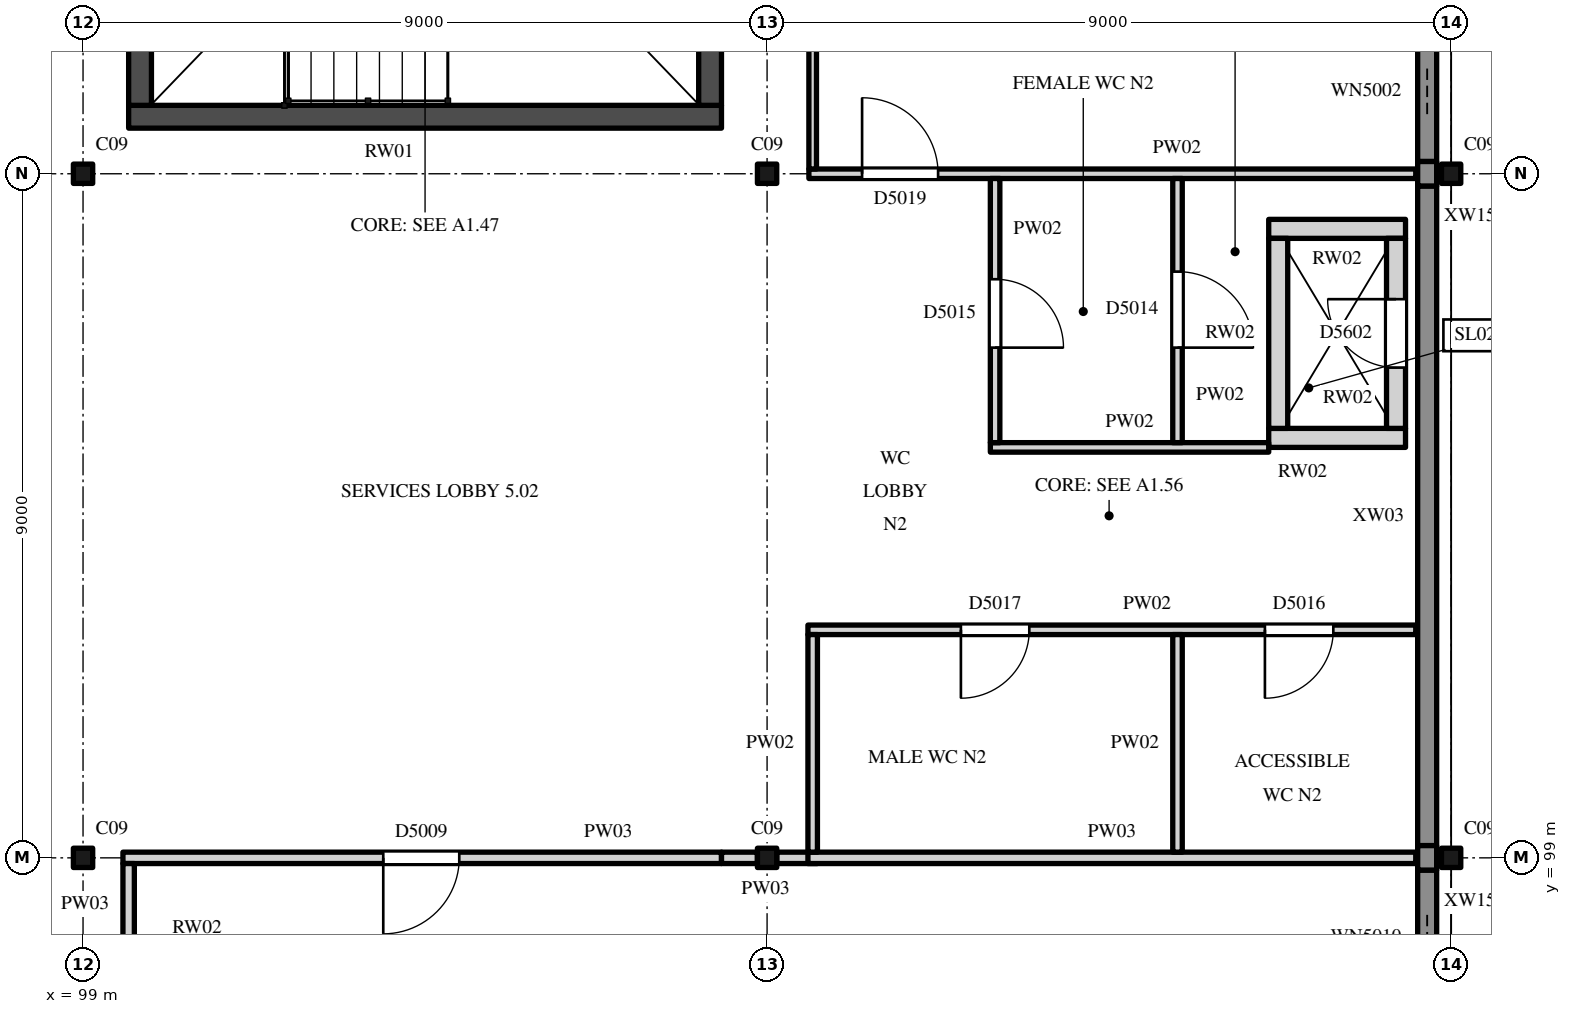
"""IFC4 building model, lengths in metres.
Left out: names, types, materials, properties, quantities, classifications, styles, units other than length and angle.
Written with IfcOpenShell. Run it as: python <this file> out.ifc"""

import sys

from ifc_helpers import new_model, si_unit, direction, frame, frame_2d, origin, origin_2d, place, context, subcontext, project, spatial, rectangle, i_section, extrude, element, fill, save


model = new_model("IFC4")
c1 = context("Model", 3, precision=1e-05, world=origin(), true_north=direction((0.0, 1.0)))
c2 = subcontext(c1, "Body", "Model", "MODEL_VIEW")
j1 = project(units=[si_unit("LENGTHUNIT", "METRE"), si_unit("PLANEANGLEUNIT", "RADIAN")], contexts=[c1])
p1 = place(None, origin())
s1 = spatial("IfcSite", under=j1, at=p1, CompositionType="ELEMENT")
p2 = place(p1, origin())
s2 = spatial("IfcBuilding", under=s1, at=p2, CompositionType="ELEMENT")
p3 = place(p2, frame((0.0, 0.0, 31.0)))
s3 = spatial("IfcBuildingStorey", under=s2, at=p3, CompositionType="ELEMENT", Elevation=31.0)
for number, where, z_axis, x_axis in (
    (1, (99.0, 99.0, 0.0), (0.0, 0.0, 1.0), (1.0, 0.0, 0.0)),
    (2, (108.0, 99.0, 0.0), (0.0, 0.0, 1.0), (1.0, 0.0, 0.0)),
    (3, (117.0, 99.0, 0.0), (0.0, 0.0, 1.0), (1.0, 0.0, 0.0)),
    (4, (99.0, 108.0, 0.0), (0.0, 0.0, 1.0), (1.0, 0.0, 0.0)),
    (5, (108.0, 108.0, 0.0), (0.0, 0.0, 1.0), (1.0, 0.0, 0.0)),
    (6, (117.0, 108.0, 0.0), (0.0, 0.0, 1.0), (1.0, 0.0, 0.0)),
):
    element("IfcColumn", number, at=place(p3, frame(where, z_axis=z_axis, x_axis=x_axis)), inside=s3, PredefinedType="COLUMN", context=c2, shape_type="SweptSolid", body=[
        extrude(i_section(OverallWidth=0.254, OverallDepth=0.254, WebThickness=0.009, FlangeThickness=0.014, FilletRadius=0.014, at=origin_2d()), origin(), (0.0, 0.0, 1.0), 5.0),
    ])
p4 = place(p3, frame((99.6, 108.75, 0.0), z_axis=(0.0, 0.0, 1.0), x_axis=(1.0, 0.0, 0.0)))
e7 = element("IfcWall", 7, at=p4, inside=s3, PredefinedType="SHEAR", context=c2, shape_type="SweptSolid", body=[
    extrude(rectangle(XDim=7.8, YDim=0.3, at=frame_2d((3.9, 0.0))), origin(), (0.0, 0.0, 1.0), 5.0),
])
p5 = place(p3, frame((99.75, 108.9, 0.0), z_axis=(0.0, 0.0, 1.0), x_axis=(0.0, 1.0, 0.0)))
e8 = element("IfcWall", 8, at=p5, inside=s3, PredefinedType="SHEAR", context=c2, shape_type="SweptSolid", body=[
    extrude(rectangle(XDim=7.8, YDim=0.3, at=frame_2d((3.9, 0.0))), origin(), (0.0, 0.0, 1.0), 5.0),
])
p6 = place(p5, frame((4.1, 0.0, 0.0)))
e9 = element("IfcOpeningElement", 9, at=p6, cuts=e8, PredefinedType="OPENING", context=c2, shape_type="SweptSolid", body=[
    extrude(rectangle(XDim=1.2, YDim=2.1, at=frame_2d((0.6, 1.05))), frame((0.0, 0.16, 0.0), z_axis=(0.0, -1.0, 0.0), x_axis=(1.0, 0.0, 0.0)), (0.0, 0.0, 1.0), 0.32),
])
p7 = place(p3, frame((107.25, 108.9, 0.0), z_axis=(0.0, 0.0, 1.0), x_axis=(0.0, 1.0, 0.0)))
e10 = element("IfcWall", 10, at=p7, inside=s3, PredefinedType="SHEAR", context=c2, shape_type="SweptSolid", body=[
    extrude(rectangle(XDim=7.8, YDim=0.3, at=frame_2d((3.9, 0.0))), origin(), (0.0, 0.0, 1.0), 5.0),
])
for number, where, z_axis, x_axis in (
    (11, (114.6, 104.525, 0.0), (0.0, 0.0, 1.0), (1.0, 0.0, 0.0)),
    (12, (114.6, 107.275, 0.0), (0.0, 0.0, 1.0), (1.0, 0.0, 0.0)),
):
    element("IfcWall", number, at=place(p3, frame(where, z_axis=z_axis, x_axis=x_axis)), inside=s3, PredefinedType="STANDARD", context=c2, shape_type="SweptSolid", body=[
        extrude(rectangle(XDim=1.8, YDim=0.25, at=frame_2d((0.9, 0.0))), origin(), (0.0, 0.0, 1.0), 5.0),
    ])
p8 = place(p3, frame((114.725, 104.65, 0.0), z_axis=(0.0, 0.0, 1.0), x_axis=(0.0, 1.0, 0.0)))
e13 = element("IfcWall", 13, at=p8, inside=s3, PredefinedType="STANDARD", context=c2, shape_type="SweptSolid", body=[
    extrude(rectangle(XDim=2.5, YDim=0.25, at=frame_2d((1.25, 0.0))), origin(), (0.0, 0.0, 1.0), 5.0),
])
p9 = place(p3, frame((116.275, 104.65, 0.0), z_axis=(0.0, 0.0, 1.0), x_axis=(0.0, 1.0, 0.0)))
e14 = element("IfcWall", 14, at=p9, inside=s3, PredefinedType="STANDARD", context=c2, shape_type="SweptSolid", body=[
    extrude(rectangle(XDim=2.5, YDim=0.25, at=frame_2d((1.25, 0.0))), origin(), (0.0, 0.0, 1.0), 5.0),
])
p10 = place(p9, frame((0.8, 0.0, 0.0)))
e15 = element("IfcOpeningElement", 15, at=p10, cuts=e14, PredefinedType="OPENING", context=c2, shape_type="SweptSolid", body=[
    extrude(rectangle(XDim=0.9, YDim=2.1, at=frame_2d((0.45, 1.05))), frame((0.0, 0.135, 0.0), z_axis=(0.0, -1.0, 0.0), x_axis=(1.0, 0.0, 0.0)), (0.0, 0.0, 1.0), 0.27),
])
p11 = place(p3, frame((116.685, 90.164, 0.0), z_axis=(0.0, 0.0, 1.0), x_axis=(0.0, 1.0, 0.0)))
e16 = element("IfcWall", 16, at=p11, inside=s3, PredefinedType="SOLIDWALL", context=c2, shape_type="SweptSolid", body=[
    extrude(rectangle(XDim=8.676, YDim=0.25, at=frame_2d((4.338, 0.0))), origin(), (0.0, 0.0, 1.0), 4.504),
])
p12 = place(p11, frame((0.586, 0.0, 1.6)))
e17 = element("IfcOpeningElement", 17, at=p12, cuts=e16, PredefinedType="OPENING", context=c2, shape_type="SweptSolid", body=[
    extrude(rectangle(XDim=0.6, YDim=1.2, at=frame_2d((0.3, 0.6))), frame((0.0, 0.135, 0.0), z_axis=(0.0, -1.0, 0.0), x_axis=(1.0, 0.0, 0.0)), (0.0, 0.0, 1.0), 0.27),
])
p13 = place(p11, frame((2.992, 0.0, 1.6)))
e18 = element("IfcOpeningElement", 18, at=p13, cuts=e16, PredefinedType="OPENING", context=c2, shape_type="SweptSolid", body=[
    extrude(rectangle(XDim=2.7, YDim=1.2, at=frame_2d((1.35, 0.6))), frame((0.0, 0.135, 0.0), z_axis=(0.0, -1.0, 0.0), x_axis=(1.0, 0.0, 0.0)), (0.0, 0.0, 1.0), 0.27),
])
p14 = place(p11, frame((7.486, 0.0, 1.6)))
e19 = element("IfcOpeningElement", 19, at=p14, cuts=e16, PredefinedType="OPENING", context=c2, shape_type="SweptSolid", body=[
    extrude(rectangle(XDim=0.6, YDim=1.2, at=frame_2d((0.3, 0.6))), frame((0.0, 0.135, 0.0), z_axis=(0.0, -1.0, 0.0), x_axis=(1.0, 0.0, 0.0)), (0.0, 0.0, 1.0), 0.27),
])
p15 = place(p3, frame((116.685, 99.161, 0.0), z_axis=(0.0, 0.0, 1.0), x_axis=(0.0, 1.0, 0.0)))
e20 = element("IfcWall", 20, at=p15, inside=s3, PredefinedType="SOLIDWALL", context=c2, shape_type="SweptSolid", body=[
    extrude(rectangle(XDim=8.678, YDim=0.25, at=frame_2d((4.339, 0.0))), origin(), (0.0, 0.0, 1.0), 4.504),
])
p16 = place(p3, frame((116.685, 108.161, 0.0), z_axis=(0.0, 0.0, 1.0), x_axis=(0.0, 1.0, 0.0)))
e21 = element("IfcWall", 21, at=p16, inside=s3, PredefinedType="SOLIDWALL", context=c2, shape_type="SweptSolid", body=[
    extrude(rectangle(XDim=8.676, YDim=0.25, at=frame_2d((4.338, 0.0))), origin(), (0.0, 0.0, 1.0), 4.504),
])
p17 = place(p16, frame((0.623, 0.0, 1.6)))
e22 = element("IfcOpeningElement", 22, at=p17, cuts=e21, PredefinedType="OPENING", context=c2, shape_type="SweptSolid", body=[
    extrude(rectangle(XDim=0.6, YDim=1.2, at=frame_2d((0.3, 0.6))), frame((0.0, 0.135, 0.0), z_axis=(0.0, -1.0, 0.0), x_axis=(1.0, 0.0, 0.0)), (0.0, 0.0, 1.0), 0.27),
])
p18 = place(p16, frame((3.017, 0.0, 1.6)))
e23 = element("IfcOpeningElement", 23, at=p18, cuts=e21, PredefinedType="OPENING", context=c2, shape_type="SweptSolid", body=[
    extrude(rectangle(XDim=2.7, YDim=1.2, at=frame_2d((1.35, 0.6))), frame((0.0, 0.135, 0.0), z_axis=(0.0, -1.0, 0.0), x_axis=(1.0, 0.0, 0.0)), (0.0, 0.0, 1.0), 0.27),
])
p19 = place(p16, frame((7.523, 0.0, 1.6)))
e24 = element("IfcOpeningElement", 24, at=p19, cuts=e21, PredefinedType="OPENING", context=c2, shape_type="SweptSolid", body=[
    extrude(rectangle(XDim=0.6, YDim=1.2, at=frame_2d((0.3, 0.6))), frame((0.0, 0.135, 0.0), z_axis=(0.0, -1.0, 0.0), x_axis=(1.0, 0.0, 0.0)), (0.0, 0.0, 1.0), 0.27),
])
for number, where, z_axis, x_axis in (
    (25, (116.685, 98.839, 0.0), (0.0, 0.0, 1.0), (0.0, 1.0, 0.0)),
    (26, (116.685, 107.839, 0.0), (0.0, 0.0, 1.0), (0.0, 1.0, 0.0)),
):
    element("IfcWall", number, at=place(p3, frame(where, z_axis=z_axis, x_axis=x_axis)), inside=s3, PredefinedType="SOLIDWALL", context=c2, shape_type="SweptSolid", body=[
        extrude(rectangle(XDim=0.322, YDim=0.25, at=frame_2d((0.161, 0.0))), origin(), (0.0, 0.0, 1.0), 4.504),
    ])
p20 = place(p3, frame((99.525, 99.0, 0.0), z_axis=(0.0, 0.0, 1.0), x_axis=(1.0, 0.0, 0.0)))
e27 = element("IfcWall", 27, at=p20, inside=s3, PredefinedType="PARTITIONING", context=c2, shape_type="SweptSolid", body=[
    extrude(rectangle(XDim=7.875, YDim=0.15, at=frame_2d((3.938, 0.0))), origin(), (0.0, 0.0, 1.0), 4.518),
])
p21 = place(p20, frame((3.425, 0.0, 0.0)))
e28 = element("IfcOpeningElement", 28, at=p21, cuts=e27, PredefinedType="OPENING", context=c2, shape_type="SweptSolid", body=[
    extrude(rectangle(XDim=1.0, YDim=2.4, at=frame_2d((0.5, 1.2))), frame((0.0, 0.085, 0.0), z_axis=(0.0, -1.0, 0.0), x_axis=(1.0, 0.0, 0.0)), (0.0, 0.0, 1.0), 0.17),
])
p22 = place(p3, frame((107.4, 99.0, 0.0), z_axis=(0.0, 0.0, 1.0), x_axis=(1.0, 0.0, 0.0)))
e29 = element("IfcWall", 29, at=p22, inside=s3, PredefinedType="PARTITIONING", context=c2, shape_type="SweptSolid", body=[
    extrude(rectangle(XDim=0.473, YDim=0.15, at=frame_2d((0.236, 0.0))), origin(), (0.0, 0.0, 1.0), 4.825),
])
p23 = place(p3, frame((108.127, 99.0, 0.0), z_axis=(0.0, 0.0, 1.0), x_axis=(1.0, 0.0, 0.0)))
e30 = element("IfcWall", 30, at=p23, inside=s3, PredefinedType="PARTITIONING", context=c2, shape_type="SweptSolid", body=[
    extrude(rectangle(XDim=0.535, YDim=0.15, at=frame_2d((0.268, 0.0))), origin(), (0.0, 0.0, 1.0), 4.518),
])
p24 = place(p3, frame((108.538, 99.0, 0.0), z_axis=(0.0, 0.0, 1.0), x_axis=(1.0, 0.0, 0.0)))
e31 = element("IfcWall", 31, at=p24, inside=s3, PredefinedType="PARTITIONING", context=c2, shape_type="SweptSolid", body=[
    extrude(rectangle(XDim=7.997, YDim=0.15, at=frame_2d((3.999, 0.0))), origin(), (0.0, 0.0, 1.0), 4.518),
])
p25 = place(p3, frame((108.538, 102.0, 0.0), z_axis=(0.0, 0.0, 1.0), x_axis=(1.0, 0.0, 0.0)))
e32 = element("IfcWall", 32, at=p25, inside=s3, PredefinedType="PARTITIONING", context=c2, shape_type="SweptSolid", body=[
    extrude(rectangle(XDim=7.997, YDim=0.125, at=frame_2d((3.999, 0.0))), origin(), (0.0, 0.0, 1.0), 4.521),
])
p26 = place(p25, frame((6.012, 0.0, 0.0)))
e33 = element("IfcOpeningElement", 33, at=p26, cuts=e32, PredefinedType="OPENING", context=c2, shape_type="SweptSolid", body=[
    extrude(rectangle(XDim=0.9, YDim=2.1, at=frame_2d((0.45, 1.05))), frame((0.0, 0.073, 0.0), z_axis=(0.0, -1.0, 0.0), x_axis=(1.0, 0.0, 0.0)), (0.0, 0.0, 1.0), 0.145),
])
p27 = place(p25, frame((2.012, 0.0, 0.0)))
e34 = element("IfcOpeningElement", 34, at=p27, cuts=e32, PredefinedType="OPENING", context=c2, shape_type="SweptSolid", body=[
    extrude(rectangle(XDim=0.9, YDim=2.1, at=frame_2d((0.45, 1.05))), frame((0.0, 0.073, 0.0), z_axis=(0.0, -1.0, 0.0), x_axis=(1.0, 0.0, 0.0)), (0.0, 0.0, 1.0), 0.145),
])
p28 = place(p3, frame((110.938, 104.4, 0.0), z_axis=(0.0, 0.0, 1.0), x_axis=(1.0, 0.0, 0.0)))
e35 = element("IfcWall", 35, at=p28, inside=s3, PredefinedType="PARTITIONING", context=c2, shape_type="SweptSolid", body=[
    extrude(rectangle(XDim=3.663, YDim=0.125, at=frame_2d((1.831, 0.0))), origin(), (0.0, 0.0, 1.0), 4.825),
])
p29 = place(p3, frame((108.55, 108.0, 0.0), z_axis=(0.0, 0.0, 1.0), x_axis=(1.0, 0.0, 0.0)))
e36 = element("IfcWall", 36, at=p29, inside=s3, PredefinedType="PARTITIONING", context=c2, shape_type="SweptSolid", body=[
    extrude(rectangle(XDim=7.985, YDim=0.125, at=frame_2d((3.992, 0.0))), origin(), (0.0, 0.0, 1.0), 4.518),
])
p30 = place(p29, frame((0.7, 0.0, 0.0)))
e37 = element("IfcOpeningElement", 37, at=p30, cuts=e36, PredefinedType="OPENING", context=c2, shape_type="SweptSolid", body=[
    extrude(rectangle(XDim=1.0, YDim=2.1, at=frame_2d((0.5, 1.05))), frame((0.0, 0.073, 0.0), z_axis=(0.0, -1.0, 0.0), x_axis=(1.0, 0.0, 0.0)), (0.0, 0.0, 1.0), 0.145),
])
p31 = place(p3, frame((99.6, 97.85, 0.0), z_axis=(0.0, 0.0, 1.0), x_axis=(0.0, 1.0, 0.0)))
e38 = element("IfcWall", 38, at=p31, inside=s3, PredefinedType="PARTITIONING", context=c2, shape_type="SweptSolid", body=[
    extrude(rectangle(XDim=1.075, YDim=0.15, at=frame_2d((0.538, 0.0))), origin(), (0.0, 0.0, 1.0), 4.825),
])
p32 = place(p3, frame((108.6, 99.075, 0.0), z_axis=(0.0, 0.0, 1.0), x_axis=(0.0, 1.0, 0.0)))
e39 = element("IfcWall", 39, at=p32, inside=s3, PredefinedType="PARTITIONING", context=c2, shape_type="SweptSolid", body=[
    extrude(rectangle(XDim=2.863, YDim=0.125, at=frame_2d((1.431, 0.0))), origin(), (0.0, 0.0, 1.0), 4.825),
])
p33 = place(p3, frame((108.6, 108.062, 0.0), z_axis=(0.0, 0.0, 1.0), x_axis=(0.0, 1.0, 0.0)))
e40 = element("IfcWall", 40, at=p33, inside=s3, PredefinedType="PARTITIONING", context=c2, shape_type="SweptSolid", body=[
    extrude(rectangle(XDim=8.887, YDim=0.1, at=frame_2d((4.444, 0.0))), origin(), (0.0, 0.0, 1.0), 4.825),
])
p34 = place(p3, frame((111.0, 104.462, 0.0), z_axis=(0.0, 0.0, 1.0), x_axis=(0.0, 1.0, 0.0)))
e41 = element("IfcWall", 41, at=p34, inside=s3, PredefinedType="PARTITIONING", context=c2, shape_type="SweptSolid", body=[
    extrude(rectangle(XDim=3.475, YDim=0.125, at=frame_2d((1.738, 0.0))), origin(), (0.0, 0.0, 1.0), 4.825),
])
p35 = place(p34, frame((1.25, 0.0, 0.0)))
e42 = element("IfcOpeningElement", 42, at=p35, cuts=e41, PredefinedType="OPENING", context=c2, shape_type="SweptSolid", body=[
    extrude(rectangle(XDim=0.9, YDim=2.1, at=frame_2d((0.45, 1.05))), frame((0.0, 0.073, 0.0), z_axis=(0.0, -1.0, 0.0), x_axis=(1.0, 0.0, 0.0)), (0.0, 0.0, 1.0), 0.145),
])
p36 = place(p3, frame((113.4, 99.075, 0.0), z_axis=(0.0, 0.0, 1.0), x_axis=(0.0, 1.0, 0.0)))
e43 = element("IfcWall", 43, at=p36, inside=s3, PredefinedType="PARTITIONING", context=c2, shape_type="SweptSolid", body=[
    extrude(rectangle(XDim=2.863, YDim=0.125, at=frame_2d((1.431, 0.0))), origin(), (0.0, 0.0, 1.0), 4.825),
])
p37 = place(p3, frame((113.4, 104.462, 0.0), z_axis=(0.0, 0.0, 1.0), x_axis=(0.0, 1.0, 0.0)))
e44 = element("IfcWall", 44, at=p37, inside=s3, PredefinedType="PARTITIONING", context=c2, shape_type="SweptSolid", body=[
    extrude(rectangle(XDim=3.475, YDim=0.125, at=frame_2d((1.738, 0.0))), origin(), (0.0, 0.0, 1.0), 4.825),
])
p38 = place(p37, frame((1.25, 0.0, 0.0)))
e45 = element("IfcOpeningElement", 45, at=p38, cuts=e44, PredefinedType="OPENING", context=c2, shape_type="SweptSolid", body=[
    extrude(rectangle(XDim=1.0, YDim=2.1, at=frame_2d((0.5, 1.05))), frame((0.0, 0.073, 0.0), z_axis=(0.0, -1.0, 0.0), x_axis=(1.0, 0.0, 0.0)), (0.0, 0.0, 1.0), 0.145),
])
p39 = place(p10, origin())
e46 = element("IfcDoor", 46, at=p39, inside=s3, OperationType="SINGLE_SWING_LEFT", PredefinedType="DOOR", context=c2, shape_type="SweptSolid", body=[
    extrude(rectangle(XDim=0.9, YDim=2.1, at=frame_2d((0.45, 1.05))), frame((0.0, 0.025, 0.0), z_axis=(0.0, -1.0, 0.0), x_axis=(1.0, 0.0, 0.0)), (0.0, 0.0, 1.0), 0.05),
])
fill(e15, e46)
p40 = place(p14, origin())
e47 = element("IfcWindow", 47, at=p40, inside=s3, PartitioningType="SINGLE_PANEL", PredefinedType="WINDOW", context=c2, shape_type="SweptSolid", body=[
    extrude(rectangle(XDim=0.6, YDim=1.2, at=frame_2d((0.3, 0.6))), frame((0.0, 0.03, 0.0), z_axis=(0.0, -1.0, 0.0), x_axis=(1.0, 0.0, 0.0)), (0.0, 0.0, 1.0), 0.06),
])
fill(e19, e47)
p41 = place(p17, origin())
e48 = element("IfcWindow", 48, at=p41, inside=s3, PartitioningType="SINGLE_PANEL", PredefinedType="WINDOW", context=c2, shape_type="SweptSolid", body=[
    extrude(rectangle(XDim=0.6, YDim=1.2, at=frame_2d((0.3, 0.6))), frame((0.0, 0.03, 0.0), z_axis=(0.0, -1.0, 0.0), x_axis=(1.0, 0.0, 0.0)), (0.0, 0.0, 1.0), 0.06),
])
fill(e22, e48)
p42 = place(p21, origin())
e49 = element("IfcDoor", 49, at=p42, inside=s3, OperationType="SINGLE_SWING_LEFT", PredefinedType="DOOR", context=c2, shape_type="SweptSolid", body=[
    extrude(rectangle(XDim=1.0, YDim=2.4, at=frame_2d((0.5, 1.2))), frame((0.0, 0.025, 0.0), z_axis=(0.0, -1.0, 0.0), x_axis=(1.0, 0.0, 0.0)), (0.0, 0.0, 1.0), 0.05),
])
fill(e28, e49)
p43 = place(p38, origin())
e50 = element("IfcDoor", 50, at=p43, inside=s3, OperationType="SINGLE_SWING_LEFT", PredefinedType="DOOR", context=c2, shape_type="SweptSolid", body=[
    extrude(rectangle(XDim=1.0, YDim=2.1, at=frame_2d((0.5, 1.05))), frame((0.0, 0.025, 0.0), z_axis=(0.0, -1.0, 0.0), x_axis=(1.0, 0.0, 0.0)), (0.0, 0.0, 1.0), 0.05),
])
fill(e45, e50)
p44 = place(p35, origin())
e51 = element("IfcDoor", 51, at=p44, inside=s3, OperationType="SINGLE_SWING_LEFT", PredefinedType="DOOR", context=c2, shape_type="SweptSolid", body=[
    extrude(rectangle(XDim=0.9, YDim=2.1, at=frame_2d((0.45, 1.05))), frame((0.0, 0.025, 0.0), z_axis=(0.0, -1.0, 0.0), x_axis=(1.0, 0.0, 0.0)), (0.0, 0.0, 1.0), 0.05),
])
fill(e42, e51)
p45 = place(p26, origin())
e52 = element("IfcDoor", 52, at=p45, inside=s3, OperationType="SINGLE_SWING_LEFT", PredefinedType="DOOR", context=c2, shape_type="SweptSolid", body=[
    extrude(rectangle(XDim=0.9, YDim=2.1, at=frame_2d((0.45, 1.05))), frame((0.0, 0.025, 0.0), z_axis=(0.0, -1.0, 0.0), x_axis=(1.0, 0.0, 0.0)), (0.0, 0.0, 1.0), 0.05),
])
fill(e33, e52)
p46 = place(p27, origin())
e53 = element("IfcDoor", 53, at=p46, inside=s3, OperationType="SINGLE_SWING_LEFT", PredefinedType="DOOR", context=c2, shape_type="SweptSolid", body=[
    extrude(rectangle(XDim=0.9, YDim=2.1, at=frame_2d((0.45, 1.05))), frame((0.0, 0.025, 0.0), z_axis=(0.0, -1.0, 0.0), x_axis=(1.0, 0.0, 0.0)), (0.0, 0.0, 1.0), 0.05),
])
fill(e34, e53)
p47 = place(p30, origin())
e54 = element("IfcDoor", 54, at=p47, inside=s3, OperationType="SINGLE_SWING_RIGHT", PredefinedType="DOOR", context=c2, shape_type="SweptSolid", body=[
    extrude(rectangle(XDim=1.0, YDim=2.1, at=frame_2d((0.5, 1.05))), frame((0.0, 0.025, 0.0), z_axis=(0.0, -1.0, 0.0), x_axis=(1.0, 0.0, 0.0)), (0.0, 0.0, 1.0), 0.05),
])
fill(e37, e54)
save(model, sys.argv[1])
